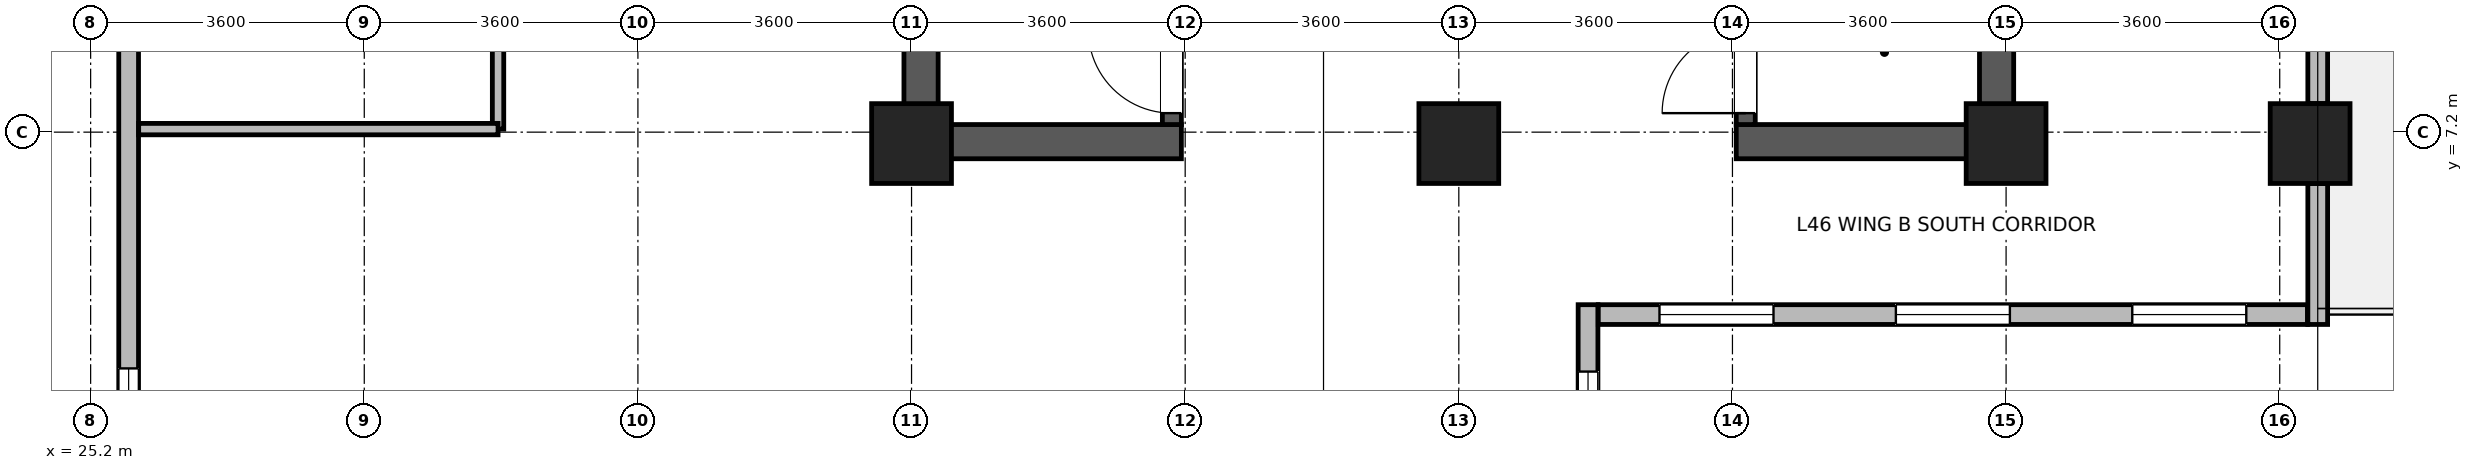
"""IFC4 building model, lengths in metres.
Left out: names, types, materials, properties, quantities, classifications, styles, units other than length and angle.
Written with IfcOpenShell. Run it as: python <this file> out.ifc"""

import sys

from ifc_helpers import new_model, si_unit, direction, frame, frame_2d, origin, origin_2d, place, context, subcontext, project, spatial, rectangle, extrude, source, transform, mapped, element, fill, save


model = new_model("IFC4")
c1 = context("Model", 3, precision=1e-05, world=origin(), true_north=direction((0.0, 1.0)))
c2 = subcontext(c1, "Body", "Model", "MODEL_VIEW")
j1 = project(units=[si_unit("LENGTHUNIT", "METRE"), si_unit("PLANEANGLEUNIT", "RADIAN")], contexts=[c1])
p1 = place(None, origin())
s1 = spatial("IfcSite", under=j1, at=p1, CompositionType="ELEMENT")
p2 = place(p1, origin())
s2 = spatial("IfcBuilding", under=s1, at=p2, CompositionType="ELEMENT")
p3 = place(p2, frame((0.0, 0.0, 180.9)))
s3 = spatial("IfcBuildingStorey", under=s2, at=p3, CompositionType="ELEMENT", Elevation=180.9)
for number, where, z_axis, x_axis in (
    (1, (36.125, 6.85, 0.0), (0.0, 0.0, 1.0), (0.0, 1.0, 0.0)),
    (2, (50.275, 6.85, 0.0), (0.0, 0.0, 1.0), (0.0, 1.0, 0.0)),
):
    element("IfcWall", number, at=place(p3, frame(where, z_axis=z_axis, x_axis=x_axis)), inside=s3, PredefinedType="SHEAR", context=c2, shape_type="SweptSolid", body=[
        extrude(rectangle(XDim=7.9, YDim=0.45, at=frame_2d((3.95, 0.0))), origin(), (0.0, 0.0, 1.0), 3.46),
    ])
for number, where, z_axis, x_axis in (
    (3, (36.35, 7.075, 0.0), (0.0, 0.0, 1.0), (1.0, 0.0, 0.0)),
    (4, (46.85, 7.075, 0.0), (0.0, 0.0, 1.0), (1.0, 0.0, 0.0)),
):
    element("IfcWall", number, at=place(p3, frame(where, z_axis=z_axis, x_axis=x_axis)), inside=s3, PredefinedType="SHEAR", context=c2, shape_type="SweptSolid", body=[
        extrude(rectangle(XDim=3.2, YDim=0.45, at=frame_2d((1.6, 0.0))), origin(), (0.0, 0.0, 1.0), 3.46),
    ])
p4 = place(p3, frame((39.425, 7.3, 0.0), z_axis=(0.0, 0.0, 1.0), x_axis=(0.0, 1.0, 0.0)))
e5 = element("IfcWall", 5, at=p4, inside=s3, PredefinedType="SHEAR", context=c2, shape_type="SweptSolid", body=[
    extrude(rectangle(XDim=7.0, YDim=0.25, at=frame_2d((3.5, 0.0))), origin(), (0.0, 0.0, 1.0), 3.46),
])
p5 = place(p4, frame((0.15, 0.0, 0.0)))
e6 = element("IfcOpeningElement", 6, at=p5, cuts=e5, PredefinedType="OPENING", context=c2, shape_type="SweptSolid", body=[
    extrude(rectangle(XDim=1.1, YDim=2.08, at=frame_2d((0.55, 1.04))), frame((0.0, 0.135, 0.0), z_axis=(0.0, -1.0, 0.0), x_axis=(1.0, 0.0, 0.0)), (0.0, 0.0, 1.0), 0.27),
])
p6 = place(p3, frame((46.975, 7.3, 0.0), z_axis=(0.0, 0.0, 1.0), x_axis=(0.0, 1.0, 0.0)))
e7 = element("IfcWall", 7, at=p6, inside=s3, PredefinedType="SHEAR", context=c2, shape_type="SweptSolid", body=[
    extrude(rectangle(XDim=7.0, YDim=0.25, at=frame_2d((3.5, 0.0))), origin(), (0.0, 0.0, 1.0), 3.46),
])
p7 = place(p6, frame((0.15, 0.0, 0.0)))
e8 = element("IfcOpeningElement", 8, at=p7, cuts=e7, PredefinedType="OPENING", context=c2, shape_type="SweptSolid", body=[
    extrude(rectangle(XDim=1.1, YDim=2.08, at=frame_2d((0.55, 1.04))), frame((0.0, 0.135, 0.0), z_axis=(0.0, -1.0, 0.0), x_axis=(1.0, 0.0, 0.0)), (0.0, 0.0, 1.0), 0.27),
])
m1 = source(origin(), c2, "Body", "SweptSolid", [
    extrude(rectangle(XDim=1.05, YDim=1.05, at=origin_2d()), origin(), (0.0, 0.0, 1.0), 3.7),
])
for number, where, z_axis, x_axis in (
    (9, (36.0, 7.05, 0.0), (0.0, 0.0, 1.0), (1.0, 0.0, 0.0)),
    (10, (43.2, 7.05, 0.0), (0.0, 0.0, 1.0), (1.0, 0.0, 0.0)),
    (11, (50.4, 7.05, 0.0), (0.0, 0.0, 1.0), (1.0, 0.0, 0.0)),
    (12, (54.4, 7.05, 0.0), (0.0, 0.0, 1.0), (1.0, 0.0, 0.0)),
):
    element("IfcColumn", number, at=place(p3, frame(where, z_axis=z_axis, x_axis=x_axis)), inside=s3, PredefinedType="COLUMN", context=c2, shape_type="MappedRepresentation", body=[
        mapped(m1, transform((0.0, 0.0, 0.0), x_axis=(1.0, 0.0, 0.0), y_axis=(0.0, 1.0, 0.0), z_axis=(0.0, 0.0, 1.0), scale=1.0)),
    ])
p8 = place(p3, frame((44.9, 4.93, 0.0), z_axis=(0.0, 0.0, 1.0), x_axis=(0.0, -1.0, 0.0)))
e13 = element("IfcWall", 13, at=p8, inside=s3, PredefinedType="STANDARD", context=c2, shape_type="SweptSolid", body=[
    extrude(rectangle(XDim=3.26, YDim=0.26, at=frame_2d((1.63, 0.0))), origin(), (0.0, 0.0, 1.0), 3.44),
])
p9 = place(p8, frame((0.88, 0.0, 0.85)))
e14 = element("IfcOpeningElement", 14, at=p9, cuts=e13, PredefinedType="OPENING", context=c2, shape_type="SweptSolid", body=[
    extrude(rectangle(XDim=1.5, YDim=1.85, at=frame_2d((0.75, 0.925))), frame((0.0, 0.14, 0.0), z_axis=(0.0, -1.0, 0.0), x_axis=(1.0, 0.0, 0.0)), (0.0, 0.0, 1.0), 0.28),
])
p10 = place(p3, frame((54.365, 4.8, 0.0), z_axis=(0.0, 0.0, 1.0), x_axis=(-1.0, 0.0, 0.0)))
e15 = element("IfcWall", 15, at=p10, inside=s3, PredefinedType="STANDARD", context=c2, shape_type="SweptSolid", body=[
    extrude(rectangle(XDim=9.33, YDim=0.26, at=frame_2d((4.665, 0.0))), origin(), (0.0, 0.0, 1.0), 3.44),
])
p11 = place(p10, frame((0.805, 0.0, 0.85)))
e16 = element("IfcOpeningElement", 16, at=p11, cuts=e15, PredefinedType="OPENING", context=c2, shape_type="SweptSolid", body=[
    extrude(rectangle(XDim=1.5, YDim=1.85, at=frame_2d((0.75, 0.925))), frame((0.0, 0.14, 0.0), z_axis=(0.0, -1.0, 0.0), x_axis=(1.0, 0.0, 0.0)), (0.0, 0.0, 1.0), 0.28),
])
p12 = place(p10, frame((3.915, 0.0, 0.85)))
e17 = element("IfcOpeningElement", 17, at=p12, cuts=e15, PredefinedType="OPENING", context=c2, shape_type="SweptSolid", body=[
    extrude(rectangle(XDim=1.5, YDim=1.85, at=frame_2d((0.75, 0.925))), frame((0.0, 0.14, 0.0), z_axis=(0.0, -1.0, 0.0), x_axis=(1.0, 0.0, 0.0)), (0.0, 0.0, 1.0), 0.28),
])
p13 = place(p10, frame((7.025, 0.0, 0.85)))
e18 = element("IfcOpeningElement", 18, at=p13, cuts=e15, PredefinedType="OPENING", context=c2, shape_type="SweptSolid", body=[
    extrude(rectangle(XDim=1.5, YDim=1.85, at=frame_2d((0.75, 0.925))), frame((0.0, 0.14, 0.0), z_axis=(0.0, -1.0, 0.0), x_axis=(1.0, 0.0, 0.0)), (0.0, 0.0, 1.0), 0.28),
])
p14 = place(p3, frame((54.5, 6.524, 0.0), z_axis=(0.0, 0.0, 1.0), x_axis=(0.0, -1.0, 0.0)))
e19 = element("IfcWall", 19, at=p14, inside=s3, PredefinedType="STANDARD", context=c2, shape_type="SweptSolid", body=[
    extrude(rectangle(XDim=1.854, YDim=0.26, at=frame_2d((0.927, 0.0))), origin(), (0.0, 0.0, 1.0), 3.44),
])
p15 = place(p3, frame((54.5, 14.024, 0.0), z_axis=(0.0, 0.0, 1.0), x_axis=(0.0, -1.0, 0.0)))
e20 = element("IfcWall", 20, at=p15, inside=s3, PredefinedType="STANDARD", context=c2, shape_type="SweptSolid", body=[
    extrude(rectangle(XDim=6.448, YDim=0.26, at=frame_2d((3.224, 0.0))), origin(), (0.0, 0.0, 1.0), 2.99),
])
p16 = place(p15, frame((4.086, 0.0, 0.85)))
e21 = element("IfcOpeningElement", 21, at=p16, cuts=e20, PredefinedType="OPENING", context=c2, shape_type="SweptSolid", body=[
    extrude(rectangle(XDim=1.5, YDim=1.85, at=frame_2d((0.75, 0.925))), frame((0.0, 0.14, 0.0), z_axis=(0.0, -1.0, 0.0), x_axis=(1.0, 0.0, 0.0)), (0.0, 0.0, 1.0), 0.28),
])
p17 = place(p15, frame((2.749, 0.0, 0.85)))
e22 = element("IfcOpeningElement", 22, at=p17, cuts=e20, PredefinedType="OPENING", context=c2, shape_type="SweptSolid", body=[
    extrude(rectangle(XDim=0.95, YDim=1.75, at=frame_2d((0.475, 0.875))), frame((0.0, 0.14, 0.0), z_axis=(0.0, -1.0, 0.0), x_axis=(1.0, 0.0, 0.0)), (0.0, 0.0, 1.0), 0.28),
])
p18 = place(p3, frame((25.7, 1.67, 0.0), z_axis=(0.0, 0.0, 1.0), x_axis=(0.0, 1.0, 0.0)))
e23 = element("IfcWall", 23, at=p18, inside=s3, PredefinedType="STANDARD", context=c2, shape_type="SweptSolid", body=[
    extrude(rectangle(XDim=20.06, YDim=0.26, at=frame_2d((10.03, 0.0))), origin(), (0.0, 0.0, 1.0), 3.44),
])
p19 = place(p18, frame((0.922, 0.0, 0.85)))
e24 = element("IfcOpeningElement", 24, at=p19, cuts=e23, PredefinedType="OPENING", context=c2, shape_type="SweptSolid", body=[
    extrude(rectangle(XDim=1.5, YDim=1.85, at=frame_2d((0.75, 0.925))), frame((0.0, 0.14, 0.0), z_axis=(0.0, -1.0, 0.0), x_axis=(1.0, 0.0, 0.0)), (0.0, 0.0, 1.0), 0.28),
])
p20 = place(p18, frame((7.608, 0.0, 0.85)))
e25 = element("IfcOpeningElement", 25, at=p20, cuts=e23, PredefinedType="OPENING", context=c2, shape_type="SweptSolid", body=[
    extrude(rectangle(XDim=1.5, YDim=1.85, at=frame_2d((0.75, 0.925))), frame((0.0, 0.14, 0.0), z_axis=(0.0, -1.0, 0.0), x_axis=(1.0, 0.0, 0.0)), (0.0, 0.0, 1.0), 0.28),
])
p21 = place(p18, frame((10.952, 0.0, 0.85)))
e26 = element("IfcOpeningElement", 26, at=p21, cuts=e23, PredefinedType="OPENING", context=c2, shape_type="SweptSolid", body=[
    extrude(rectangle(XDim=1.5, YDim=1.85, at=frame_2d((0.75, 0.925))), frame((0.0, 0.14, 0.0), z_axis=(0.0, -1.0, 0.0), x_axis=(1.0, 0.0, 0.0)), (0.0, 0.0, 1.0), 0.28),
])
p22 = place(p18, frame((14.295, 0.0, 0.85)))
e27 = element("IfcOpeningElement", 27, at=p22, cuts=e23, PredefinedType="OPENING", context=c2, shape_type="SweptSolid", body=[
    extrude(rectangle(XDim=1.5, YDim=1.85, at=frame_2d((0.75, 0.925))), frame((0.0, 0.14, 0.0), z_axis=(0.0, -1.0, 0.0), x_axis=(1.0, 0.0, 0.0)), (0.0, 0.0, 1.0), 0.28),
])
p23 = place(p18, frame((17.638, 0.0, 0.85)))
e28 = element("IfcOpeningElement", 28, at=p23, cuts=e23, PredefinedType="OPENING", context=c2, shape_type="SweptSolid", body=[
    extrude(rectangle(XDim=1.5, YDim=1.85, at=frame_2d((0.75, 0.925))), frame((0.0, 0.14, 0.0), z_axis=(0.0, -1.0, 0.0), x_axis=(1.0, 0.0, 0.0)), (0.0, 0.0, 1.0), 0.28),
])
p24 = place(p3, frame((30.56, 7.24, 0.0), z_axis=(0.0, 0.0, 1.0), x_axis=(0.0, 1.0, 0.0)))
e29 = element("IfcWall", 29, at=p24, inside=s3, PredefinedType="PARTITIONING", context=c2, shape_type="SweptSolid", body=[
    extrude(rectangle(XDim=7.26, YDim=0.15, at=frame_2d((3.63, 0.0))), origin(), (0.0, 0.0, 1.0), 3.44),
])
p25 = place(p24, frame((2.98, 0.0, 0.0)))
e30 = element("IfcOpeningElement", 30, at=p25, cuts=e29, PredefinedType="OPENING", context=c2, shape_type="SweptSolid", body=[
    extrude(rectangle(XDim=1.3, YDim=2.12, at=frame_2d((0.65, 1.06))), frame((0.0, 0.085, 0.0), z_axis=(0.0, -1.0, 0.0), x_axis=(1.0, 0.0, 0.0)), (0.0, 0.0, 1.0), 0.17),
])
p26 = place(p3, frame((25.832, 7.24, 0.0), z_axis=(0.0, 0.0, 1.0), x_axis=(1.0, 0.0, 0.0)))
e31 = element("IfcWall", 31, at=p26, inside=s3, PredefinedType="PARTITIONING", context=c2, shape_type="SweptSolid", body=[
    extrude(rectangle(XDim=4.728, YDim=0.15, at=frame_2d((2.364, 0.0))), origin(), (0.0, 0.0, 1.0), 3.44),
])
p27 = place(p9, origin())
e32 = element("IfcWindow", 32, at=p27, inside=s3, PartitioningType="SINGLE_PANEL", PredefinedType="WINDOW", context=c2, shape_type="SweptSolid", body=[
    extrude(rectangle(XDim=1.5, YDim=1.85, at=frame_2d((0.75, 0.925))), frame((0.0, 0.03, 0.0), z_axis=(0.0, -1.0, 0.0), x_axis=(1.0, 0.0, 0.0)), (0.0, 0.0, 1.0), 0.06),
])
fill(e14, e32)
p28 = place(p11, origin())
e33 = element("IfcWindow", 33, at=p28, inside=s3, PartitioningType="SINGLE_PANEL", PredefinedType="WINDOW", context=c2, shape_type="SweptSolid", body=[
    extrude(rectangle(XDim=1.5, YDim=1.85, at=frame_2d((0.75, 0.925))), frame((0.0, 0.03, 0.0), z_axis=(0.0, -1.0, 0.0), x_axis=(1.0, 0.0, 0.0)), (0.0, 0.0, 1.0), 0.06),
])
fill(e16, e33)
p29 = place(p12, origin())
e34 = element("IfcWindow", 34, at=p29, inside=s3, PartitioningType="SINGLE_PANEL", PredefinedType="WINDOW", context=c2, shape_type="SweptSolid", body=[
    extrude(rectangle(XDim=1.5, YDim=1.85, at=frame_2d((0.75, 0.925))), frame((0.0, 0.03, 0.0), z_axis=(0.0, -1.0, 0.0), x_axis=(1.0, 0.0, 0.0)), (0.0, 0.0, 1.0), 0.06),
])
fill(e17, e34)
p30 = place(p13, origin())
e35 = element("IfcWindow", 35, at=p30, inside=s3, PartitioningType="SINGLE_PANEL", PredefinedType="WINDOW", context=c2, shape_type="SweptSolid", body=[
    extrude(rectangle(XDim=1.5, YDim=1.85, at=frame_2d((0.75, 0.925))), frame((0.0, 0.03, 0.0), z_axis=(0.0, -1.0, 0.0), x_axis=(1.0, 0.0, 0.0)), (0.0, 0.0, 1.0), 0.06),
])
fill(e18, e35)
p31 = place(p19, origin())
e36 = element("IfcWindow", 36, at=p31, inside=s3, PartitioningType="SINGLE_PANEL", PredefinedType="WINDOW", context=c2, shape_type="SweptSolid", body=[
    extrude(rectangle(XDim=1.5, YDim=1.85, at=frame_2d((0.75, 0.925))), frame((0.0, 0.03, 0.0), z_axis=(0.0, -1.0, 0.0), x_axis=(1.0, 0.0, 0.0)), (0.0, 0.0, 1.0), 0.06),
])
fill(e24, e36)
p32 = place(p5, origin())
e37 = element("IfcDoor", 37, at=p32, inside=s3, OperationType="SINGLE_SWING_RIGHT", PredefinedType="DOOR", context=c2, shape_type="SweptSolid", body=[
    extrude(rectangle(XDim=1.1, YDim=2.08, at=frame_2d((0.55, 1.04))), frame((0.0, 0.025, 0.0), z_axis=(0.0, -1.0, 0.0), x_axis=(1.0, 0.0, 0.0)), (0.0, 0.0, 1.0), 0.05),
])
fill(e6, e37)
p33 = place(p7, origin())
e38 = element("IfcDoor", 38, at=p33, inside=s3, OperationType="SINGLE_SWING_LEFT", PredefinedType="DOOR", context=c2, shape_type="SweptSolid", body=[
    extrude(rectangle(XDim=1.1, YDim=2.08, at=frame_2d((0.55, 1.04))), frame((0.0, 0.025, 0.0), z_axis=(0.0, -1.0, 0.0), x_axis=(1.0, 0.0, 0.0)), (0.0, 0.0, 1.0), 0.05),
])
fill(e8, e38)
save(model, sys.argv[1])
